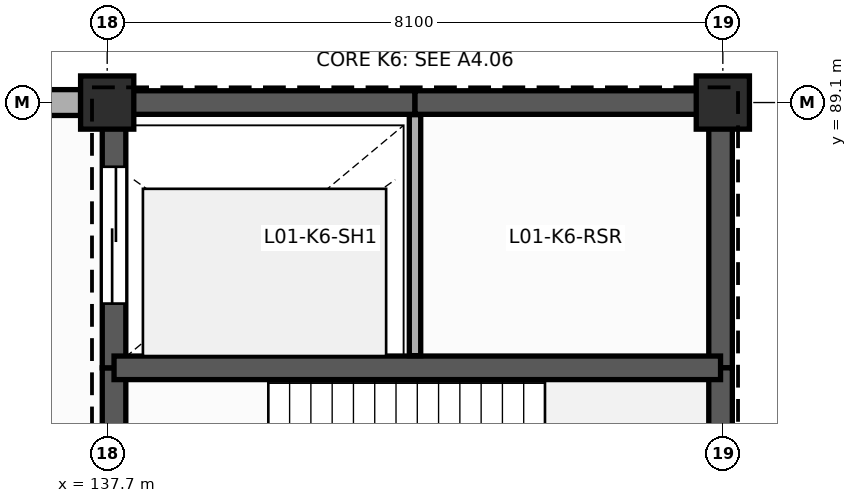
"""IFC4 building model, lengths in metres.
Left out: names, types, materials, properties, quantities, classifications, styles, units other than length and angle.
Written with IfcOpenShell. Run it as: python <this file> out.ifc"""

import sys

from ifc_helpers import new_model, si_unit, direction, frame, frame_2d, origin, origin_2d, place, context, subcontext, project, spatial, rectangle, extrude, element, fill, save


model = new_model("IFC4")
c1 = context("Model", 3, precision=1e-05, world=origin(), true_north=direction((0.0, 1.0)))
c2 = subcontext(c1, "Body", "Model", "MODEL_VIEW")
j1 = project(units=[si_unit("LENGTHUNIT", "METRE"), si_unit("PLANEANGLEUNIT", "RADIAN")], contexts=[c1])
p1 = place(None, origin())
s1 = spatial("IfcSite", under=j1, at=p1, CompositionType="ELEMENT")
p2 = place(p1, origin())
s2 = spatial("IfcBuilding", under=s1, at=p2, CompositionType="ELEMENT")
p3 = place(p2, frame((0.0, 0.0, 5.4)))
s3 = spatial("IfcBuildingStorey", under=s2, at=p3, CompositionType="ELEMENT", Elevation=5.4)
for number, where, z_axis, x_axis in (
    (1, (137.7, 89.1, 0.0), (0.0, 0.0, 1.0), (1.0, 0.0, 0.0)),
    (2, (145.8, 89.1, 0.0), (0.0, 0.0, 1.0), (1.0, 0.0, 0.0)),
):
    element("IfcColumn", number, at=place(p3, frame(where, z_axis=z_axis, x_axis=x_axis)), inside=s3, PredefinedType="COLUMN", context=c2, shape_type="SweptSolid", body=[
        extrude(rectangle(XDim=0.7, YDim=0.7, at=origin_2d()), origin(), (0.0, 0.0, 1.0), 4.8),
    ])
p4 = place(p3, frame((137.35, 89.1, 0.0), z_axis=(0.0, 0.0, 1.0), x_axis=(-1.0, 0.0, 0.0)))
e3 = element("IfcWall", 3, at=p4, inside=s3, PredefinedType="SOLIDWALL", context=c2, shape_type="SweptSolid", body=[
    extrude(rectangle(XDim=7.4, YDim=0.34, at=frame_2d((3.7, 0.0))), origin(), (0.0, 0.0, 1.0), 4.107),
])
p5 = place(p3, frame((137.79, 81.25, 0.0), z_axis=(0.0, 0.0, 1.0), x_axis=(0.0, 1.0, 0.0)))
e4 = element("IfcWall", 4, at=p5, inside=s3, PredefinedType="SHEAR", context=c2, shape_type="SweptSolid", body=[
    extrude(rectangle(XDim=4.36, YDim=0.31, at=frame_2d((2.18, 0.0))), origin(), (0.0, 0.0, 1.0), 4.8),
])
p6 = place(p5, frame((1.35, 0.0, 0.0)))
e5 = element("IfcOpeningElement", 5, at=p6, cuts=e4, PredefinedType="OPENING", context=c2, shape_type="SweptSolid", body=[
    extrude(rectangle(XDim=1.2, YDim=2.25, at=frame_2d((0.6, 1.125))), frame((0.0, 0.165, 0.0), z_axis=(0.0, -1.0, 0.0), x_axis=(1.0, 0.0, 0.0)), (0.0, 0.0, 1.0), 0.33),
])
p7 = place(p3, frame((137.79, 85.61, 0.0), z_axis=(0.0, 0.0, 1.0), x_axis=(0.0, 1.0, 0.0)))
e6 = element("IfcWall", 6, at=p7, inside=s3, PredefinedType="SHEAR", context=c2, shape_type="SweptSolid", body=[
    extrude(rectangle(XDim=3.49, YDim=0.31, at=frame_2d((1.745, 0.0))), origin(), (0.0, 0.0, 1.0), 4.8),
])
p8 = place(p7, frame((0.845, 0.0, 0.0)))
e7 = element("IfcOpeningElement", 7, at=p8, cuts=e6, PredefinedType="OPENING", context=c2, shape_type="SweptSolid", body=[
    extrude(rectangle(XDim=1.8, YDim=2.4, at=frame_2d((0.9, 1.2))), frame((0.0, 0.165, 0.0), z_axis=(0.0, -1.0, 0.0), x_axis=(1.0, 0.0, 0.0)), (0.0, 0.0, 1.0), 0.33),
])
p9 = place(p3, frame((137.79, 89.1, 0.0), z_axis=(0.0, 0.0, 1.0), x_axis=(1.0, 0.0, 0.0)))
e8 = element("IfcWall", 8, at=p9, inside=s3, PredefinedType="SHEAR", context=c2, shape_type="SweptSolid", body=[
    extrude(rectangle(XDim=3.96, YDim=0.31, at=frame_2d((1.98, 0.0))), origin(), (0.0, 0.0, 1.0), 4.8),
])
p10 = place(p3, frame((141.75, 89.1, 0.0), z_axis=(0.0, 0.0, 1.0), x_axis=(1.0, 0.0, 0.0)))
e9 = element("IfcWall", 9, at=p10, inside=s3, PredefinedType="SHEAR", context=c2, shape_type="SweptSolid", body=[
    extrude(rectangle(XDim=4.02, YDim=0.31, at=frame_2d((2.01, 0.0))), origin(), (0.0, 0.0, 1.0), 4.8),
])
p11 = place(p3, frame((145.77, 89.1, 0.0), z_axis=(0.0, 0.0, 1.0), x_axis=(0.0, -1.0, 0.0)))
e10 = element("IfcWall", 10, at=p11, inside=s3, PredefinedType="SHEAR", context=c2, shape_type="SweptSolid", body=[
    extrude(rectangle(XDim=3.49, YDim=0.31, at=frame_2d((1.745, 0.0))), origin(), (0.0, 0.0, 1.0), 4.8),
])
p12 = place(p3, frame((145.77, 85.61, 0.0), z_axis=(0.0, 0.0, 1.0), x_axis=(0.0, -1.0, 0.0)))
e11 = element("IfcWall", 11, at=p12, inside=s3, PredefinedType="SHEAR", context=c2, shape_type="SweptSolid", body=[
    extrude(rectangle(XDim=4.36, YDim=0.31, at=frame_2d((2.18, 0.0))), origin(), (0.0, 0.0, 1.0), 4.8),
])
p13 = place(p3, frame((137.79, 85.61, 0.0), z_axis=(0.0, 0.0, 1.0), x_axis=(1.0, 0.0, 0.0)))
e12 = element("IfcWall", 12, at=p13, inside=s3, PredefinedType="SHEAR", context=c2, shape_type="SweptSolid", body=[
    extrude(rectangle(XDim=7.98, YDim=0.31, at=frame_2d((3.99, 0.0))), origin(), (0.0, 0.0, 1.0), 4.8),
])
p14 = place(p3, frame((141.75, 85.77, 0.0), z_axis=(0.0, 0.0, 1.0), x_axis=(0.0, 1.0, 0.0)))
e13 = element("IfcWall", 13, at=p14, inside=s3, PredefinedType="PLUMBINGWALL", context=c2, shape_type="SweptSolid", body=[
    extrude(rectangle(XDim=3.17, YDim=0.15, at=frame_2d((1.585, 0.0))), origin(), (0.0, 0.0, 1.0), 4.45),
])
p15 = place(p8, origin())
e14 = element("IfcDoor", 14, at=p15, inside=s3, OperationType="SLIDING_TO_LEFT", PredefinedType="DOOR", context=c2, shape_type="SweptSolid", body=[
    extrude(rectangle(XDim=1.8, YDim=2.4, at=frame_2d((0.9, 1.2))), frame((0.0, 0.025, 0.0), z_axis=(0.0, -1.0, 0.0), x_axis=(1.0, 0.0, 0.0)), (0.0, 0.0, 1.0), 0.05),
])
fill(e7, e14)
save(model, sys.argv[1])
